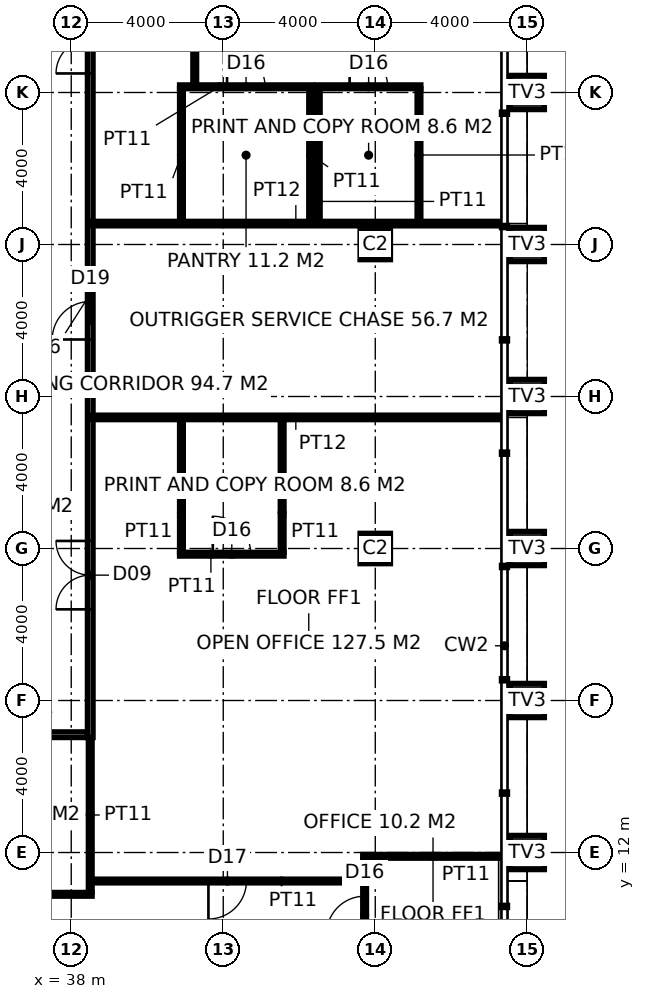
"""IFC4 building model, lengths in metres.
Left out: names, types, materials, properties, quantities, classifications, styles, units other than length and angle.
Written with IfcOpenShell. Run it as: python <this file> out.ifc"""

import sys

from ifc_helpers import new_model, si_unit, direction, frame, frame_2d, origin, origin_2d, place, context, subcontext, project, spatial, rectangle, hollow_rectangle, extrude, element, fill, save


model = new_model("IFC4")
c1 = context("Model", 3, precision=1e-05, world=origin(), true_north=direction((0.0, 1.0)))
c2 = subcontext(c1, "Body", "Model", "MODEL_VIEW")
j1 = project(units=[si_unit("LENGTHUNIT", "METRE"), si_unit("PLANEANGLEUNIT", "RADIAN")], contexts=[c1])
p1 = place(None, origin())
s1 = spatial("IfcSite", under=j1, at=p1, CompositionType="ELEMENT")
p2 = place(p1, origin())
s2 = spatial("IfcBuilding", under=s1, at=p2, CompositionType="ELEMENT")
p3 = place(p2, frame((0.0, 0.0, 238.2)))
s3 = spatial("IfcBuildingStorey", under=s2, at=p3, CompositionType="ELEMENT", Elevation=238.2)
for number, where, z_axis, x_axis in (
    (1, (50.0, 12.0, 0.0), (0.0, 0.0, 1.0), (1.0, 0.0, 0.0)),
    (2, (50.0, 16.0, 0.0), (0.0, 0.0, 1.0), (1.0, 0.0, 0.0)),
    (3, (50.0, 20.0, 0.0), (0.0, 0.0, 1.0), (1.0, 0.0, 0.0)),
    (4, (50.0, 24.0, 0.0), (0.0, 0.0, 1.0), (1.0, 0.0, 0.0)),
    (5, (50.0, 28.0, 0.0), (0.0, 0.0, 1.0), (1.0, 0.0, 0.0)),
    (6, (50.0, 32.0, 0.0), (0.0, 0.0, 1.0), (1.0, 0.0, 0.0)),
):
    element("IfcColumn", number, at=place(p3, frame(where, z_axis=z_axis, x_axis=x_axis)), inside=s3, PredefinedType="USERDEFINED", context=c2, shape_type="SweptSolid", body=[
        extrude(hollow_rectangle(XDim=0.9, YDim=0.9, WallThickness=0.08, at=origin_2d()), origin(), (0.0, 0.0, 1.0), 4.0),
    ])
for number, where, z_axis, x_axis in (
    (7, (46.0, 20.0, 0.0), (0.0, 0.0, 1.0), (1.0, 0.0, 0.0)),
    (8, (46.0, 28.0, 0.0), (0.0, 0.0, 1.0), (1.0, 0.0, 0.0)),
):
    element("IfcColumn", number, at=place(p3, frame(where, z_axis=z_axis, x_axis=x_axis)), inside=s3, PredefinedType="COLUMN", context=c2, shape_type="SweptSolid", body=[
        extrude(hollow_rectangle(XDim=0.8, YDim=0.8, WallThickness=0.08, at=origin_2d()), origin(), (0.0, 0.0, 1.0), 4.0),
    ])
p4 = place(p3, frame((38.5, 15.025, 0.0), z_axis=(0.0, 0.0, 1.0), x_axis=(0.0, 1.0, 0.0)))
e9 = element("IfcWall", 9, at=p4, inside=s3, PredefinedType="PARTITIONING", context=c2, shape_type="SweptSolid", body=[
    extrude(rectangle(XDim=23.35, YDim=0.15, at=frame_2d((11.675, 0.0))), origin(), (0.0, 0.0, 1.0), 2.65),
])
p5 = place(p4, frame((3.374, 0.0, 0.0)))
e10 = element("IfcOpeningElement", 10, at=p5, cuts=e9, PredefinedType="OPENING", context=c2, shape_type="SweptSolid", body=[
    extrude(rectangle(XDim=1.8, YDim=2.4, at=frame_2d((0.9, 1.2))), frame((0.0, 0.085, 0.0), z_axis=(0.0, -1.0, 0.0), x_axis=(1.0, 0.0, 0.0)), (0.0, 0.0, 1.0), 0.17),
])
p6 = place(p4, frame((17.476, 0.0, 0.0)))
e11 = element("IfcOpeningElement", 11, at=p6, cuts=e9, PredefinedType="OPENING", context=c2, shape_type="SweptSolid", body=[
    extrude(rectangle(XDim=1.8, YDim=2.4, at=frame_2d((0.9, 1.2))), frame((0.0, 0.085, 0.0), z_axis=(0.0, -1.0, 0.0), x_axis=(1.0, 0.0, 0.0)), (0.0, 0.0, 1.0), 0.17),
])
p7 = place(p4, frame((10.475, 0.0, 0.0)))
e12 = element("IfcOpeningElement", 12, at=p7, cuts=e9, PredefinedType="OPENING", context=c2, shape_type="SweptSolid", body=[
    extrude(rectangle(XDim=1.0, YDim=2.2, at=frame_2d((0.5, 1.1))), frame((0.0, 0.085, 0.0), z_axis=(0.0, -1.0, 0.0), x_axis=(1.0, 0.0, 0.0)), (0.0, 0.0, 1.0), 0.17),
])
p8 = place(p3, frame((15.775, 15.1, 0.0), z_axis=(0.0, 0.0, 1.0), x_axis=(1.0, 0.0, 0.0)))
e13 = element("IfcWall", 13, at=p8, inside=s3, PredefinedType="PARTITIONING", context=c2, shape_type="SweptSolid", body=[
    extrude(rectangle(XDim=22.65, YDim=0.15, at=frame_2d((11.325, 0.0))), origin(), (0.0, 0.0, 1.0), 3.85),
])
p9 = place(p8, frame((11.725, 0.0, 0.0)))
e14 = element("IfcOpeningElement", 14, at=p9, cuts=e13, PredefinedType="OPENING", context=c2, shape_type="SweptSolid", body=[
    extrude(rectangle(XDim=1.0, YDim=2.2, at=frame_2d((0.5, 1.1))), frame((0.0, 0.085, 0.0), z_axis=(0.0, -1.0, 0.0), x_axis=(1.0, 0.0, 0.0)), (0.0, 0.0, 1.0), 0.17),
])
for number, where, z_axis, x_axis in (
    (15, (38.5, 23.45, 0.0), (0.0, 0.0, 1.0), (1.0, 0.0, 0.0)),
    (16, (38.5, 28.55, 0.0), (0.0, 0.0, 1.0), (1.0, 0.0, 0.0)),
):
    element("IfcWall", number, at=place(p3, frame(where, z_axis=z_axis, x_axis=x_axis)), inside=s3, PredefinedType="PARTITIONING", context=c2, shape_type="SweptSolid", body=[
        extrude(rectangle(XDim=10.82, YDim=0.12, at=frame_2d((5.41, 0.0))), origin(), (0.0, 0.0, 1.0), 2.65),
    ])
p10 = place(p3, frame((30.611, 10.9, 0.0), z_axis=(0.0, 0.0, 1.0), x_axis=(1.0, 0.0, 0.0)))
e17 = element("IfcWall", 17, at=p10, inside=s3, PredefinedType="PARTITIONING", context=c2, shape_type="SweptSolid", body=[
    extrude(rectangle(XDim=7.939, YDim=0.1, at=frame_2d((3.969, 0.0))), origin(), (0.0, 0.0, 1.0), 3.85),
])
p11 = place(p10, frame((1.065, 0.0, 0.0)))
e18 = element("IfcOpeningElement", 18, at=p11, cuts=e17, PredefinedType="OPENING", context=c2, shape_type="SweptSolid", body=[
    extrude(rectangle(XDim=1.0, YDim=2.2, at=frame_2d((0.5, 1.1))), frame((0.0, 0.06, 0.0), z_axis=(0.0, -1.0, 0.0), x_axis=(1.0, 0.0, 0.0)), (0.0, 0.0, 1.0), 0.12),
])
p12 = place(p10, frame((5.04, 0.0, 0.0)))
e19 = element("IfcOpeningElement", 19, at=p12, cuts=e17, PredefinedType="OPENING", context=c2, shape_type="SweptSolid", body=[
    extrude(rectangle(XDim=1.0, YDim=2.2, at=frame_2d((0.5, 1.1))), frame((0.0, 0.06, 0.0), z_axis=(0.0, -1.0, 0.0), x_axis=(1.0, 0.0, 0.0)), (0.0, 0.0, 1.0), 0.12),
])
p13 = place(p3, frame((45.67, 11.9, 0.0), z_axis=(0.0, 0.0, 1.0), x_axis=(1.0, 0.0, 0.0)))
e20 = element("IfcWall", 20, at=p13, inside=s3, PredefinedType="PARTITIONING", context=c2, shape_type="SweptSolid", body=[
    extrude(rectangle(XDim=3.7, YDim=0.1, at=frame_2d((1.85, 0.0))), origin(), (0.0, 0.0, 1.0), 3.85),
])
p14 = place(p3, frame((40.85, 19.85, 0.0), z_axis=(0.0, 0.0, 1.0), x_axis=(1.0, 0.0, 0.0)))
e21 = element("IfcWall", 21, at=p14, inside=s3, PredefinedType="PARTITIONING", context=c2, shape_type="SweptSolid", body=[
    extrude(rectangle(XDim=2.75, YDim=0.1, at=frame_2d((1.375, 0.0))), origin(), (0.0, 0.0, 1.0), 2.85),
])
p15 = place(p14, frame((0.875, 0.0, 0.0)))
e22 = element("IfcOpeningElement", 22, at=p15, cuts=e21, PredefinedType="OPENING", context=c2, shape_type="SweptSolid", body=[
    extrude(rectangle(XDim=1.0, YDim=2.2, at=frame_2d((0.5, 1.1))), frame((0.0, 0.06, 0.0), z_axis=(0.0, -1.0, 0.0), x_axis=(1.0, 0.0, 0.0)), (0.0, 0.0, 1.0), 0.12),
])
p16 = place(p3, frame((40.85, 32.15, 0.0), z_axis=(0.0, 0.0, 1.0), x_axis=(1.0, 0.0, 0.0)))
e23 = element("IfcWall", 23, at=p16, inside=s3, PredefinedType="PARTITIONING", context=c2, shape_type="SweptSolid", body=[
    extrude(rectangle(XDim=3.5, YDim=0.1, at=frame_2d((1.75, 0.0))), origin(), (0.0, 0.0, 1.0), 2.95),
])
p17 = place(p16, frame((1.25, 0.0, 0.0)))
e24 = element("IfcOpeningElement", 24, at=p17, cuts=e23, PredefinedType="OPENING", context=c2, shape_type="SweptSolid", body=[
    extrude(rectangle(XDim=1.0, YDim=2.2, at=frame_2d((0.5, 1.1))), frame((0.0, 0.06, 0.0), z_axis=(0.0, -1.0, 0.0), x_axis=(1.0, 0.0, 0.0)), (0.0, 0.0, 1.0), 0.12),
])
p18 = place(p3, frame((44.45, 32.15, 0.0), z_axis=(0.0, 0.0, 1.0), x_axis=(1.0, 0.0, 0.0)))
e25 = element("IfcWall", 25, at=p18, inside=s3, PredefinedType="PARTITIONING", context=c2, shape_type="SweptSolid", body=[
    extrude(rectangle(XDim=2.75, YDim=0.1, at=frame_2d((1.375, 0.0))), origin(), (0.0, 0.0, 1.0), 2.95),
])
p19 = place(p18, frame((0.875, 0.0, 0.0)))
e26 = element("IfcOpeningElement", 26, at=p19, cuts=e25, PredefinedType="OPENING", context=c2, shape_type="SweptSolid", body=[
    extrude(rectangle(XDim=1.0, YDim=2.2, at=frame_2d((0.5, 1.1))), frame((0.0, 0.06, 0.0), z_axis=(0.0, -1.0, 0.0), x_axis=(1.0, 0.0, 0.0)), (0.0, 0.0, 1.0), 0.12),
])
p20 = place(p3, frame((38.5, 10.95, 0.0), z_axis=(0.0, 0.0, 1.0), x_axis=(0.0, 1.0, 0.0)))
e27 = element("IfcWall", 27, at=p20, inside=s3, PredefinedType="PARTITIONING", context=c2, shape_type="SweptSolid", body=[
    extrude(rectangle(XDim=4.075, YDim=0.1, at=frame_2d((2.038, 0.0))), origin(), (0.0, 0.0, 1.0), 2.65),
])
for number, where, z_axis, x_axis in (
    (28, (40.9, 19.9, 0.0), (0.0, 0.0, 1.0), (0.0, 1.0, 0.0)),
    (29, (40.9, 28.61, 0.0), (0.0, 0.0, 1.0), (0.0, 1.0, 0.0)),
    (30, (43.55, 19.9, 0.0), (0.0, 0.0, 1.0), (0.0, 1.0, 0.0)),
    (31, (44.3, 28.61, 0.0), (0.0, 0.0, 1.0), (0.0, 1.0, 0.0)),
    (32, (44.5, 28.61, 0.0), (0.0, 0.0, 1.0), (0.0, 1.0, 0.0)),
):
    element("IfcWall", number, at=place(p3, frame(where, z_axis=z_axis, x_axis=x_axis)), inside=s3, PredefinedType="PARTITIONING", context=c2, shape_type="SweptSolid", body=[
        extrude(rectangle(XDim=3.49, YDim=0.1, at=frame_2d((1.745, 0.0))), origin(), (0.0, 0.0, 1.0), 3.85),
    ])
p21 = place(p3, frame((45.72, 8.85, 0.0), z_axis=(0.0, 0.0, 1.0), x_axis=(0.0, 1.0, 0.0)))
e33 = element("IfcWall", 33, at=p21, inside=s3, PredefinedType="PARTITIONING", context=c2, shape_type="SweptSolid", body=[
    extrude(rectangle(XDim=3.0, YDim=0.1, at=frame_2d((1.5, 0.0))), origin(), (0.0, 0.0, 1.0), 2.65),
])
p22 = place(p21, frame((1.0, 0.0, 0.0)))
e34 = element("IfcOpeningElement", 34, at=p22, cuts=e33, PredefinedType="OPENING", context=c2, shape_type="SweptSolid", body=[
    extrude(rectangle(XDim=1.0, YDim=2.2, at=frame_2d((0.5, 1.1))), frame((0.0, 0.06, 0.0), z_axis=(0.0, -1.0, 0.0), x_axis=(1.0, 0.0, 0.0)), (0.0, 0.0, 1.0), 0.12),
])
p23 = place(p3, frame((47.15, 28.61, 0.0), z_axis=(0.0, 0.0, 1.0), x_axis=(0.0, 1.0, 0.0)))
e35 = element("IfcWall", 35, at=p23, inside=s3, PredefinedType="PARTITIONING", context=c2, shape_type="SweptSolid", body=[
    extrude(rectangle(XDim=3.49, YDim=0.1, at=frame_2d((1.745, 0.0))), origin(), (0.0, 0.0, 1.0), 3.85),
])
p24 = place(p3, frame((45.67, 11.25, 0.0), z_axis=(0.0, 0.0, 1.0), x_axis=(-1.0, 0.0, 0.0)))
e36 = element("IfcWall", 36, at=p24, inside=s3, PredefinedType="PARTITIONING", context=c2, shape_type="SweptSolid", body=[
    extrude(rectangle(XDim=7.12, YDim=0.1, at=frame_2d((3.56, 0.0))), origin(), (0.0, 0.0, 1.0), 3.85),
])
p25 = place(p24, frame((3.06, 0.0, 0.0)))
e37 = element("IfcOpeningElement", 37, at=p25, cuts=e36, PredefinedType="OPENING", context=c2, shape_type="SweptSolid", body=[
    extrude(rectangle(XDim=1.0, YDim=2.2, at=frame_2d((0.5, 1.1))), frame((0.0, 0.06, 0.0), z_axis=(0.0, -1.0, 0.0), x_axis=(1.0, 0.0, 0.0)), (0.0, 0.0, 1.0), 0.12),
])
p26 = place(p3, frame((41.25, 32.2, 0.0), z_axis=(0.0, 0.0, 1.0), x_axis=(0.0, 1.0, 0.0)))
e38 = element("IfcWall", 38, at=p26, inside=s3, PredefinedType="PARTITIONING", context=c2, shape_type="SweptSolid", body=[
    extrude(rectangle(XDim=7.47, YDim=0.1, at=frame_2d((3.735, 0.0))), origin(), (0.0, 0.0, 1.0), 3.85),
])
p27 = place(p26, frame((3.235, 0.0, 0.0)))
e39 = element("IfcOpeningElement", 39, at=p27, cuts=e38, PredefinedType="OPENING", context=c2, shape_type="SweptSolid", body=[
    extrude(rectangle(XDim=1.0, YDim=2.2, at=frame_2d((0.5, 1.1))), frame((0.0, 0.06, 0.0), z_axis=(0.0, -1.0, 0.0), x_axis=(1.0, 0.0, 0.0)), (0.0, 0.0, 1.0), 0.12),
])
p28 = place(p5, origin())
e40 = element("IfcDoor", 40, at=p28, inside=s3, OperationType="DOUBLE_DOOR_DOUBLE_SWING", PredefinedType="DOOR", context=c2, shape_type="SweptSolid", body=[
    extrude(rectangle(XDim=1.8, YDim=2.4, at=frame_2d((0.9, 1.2))), frame((0.0, 0.025, 0.0), z_axis=(0.0, -1.0, 0.0), x_axis=(1.0, 0.0, 0.0)), (0.0, 0.0, 1.0), 0.05),
])
fill(e10, e40)
p29 = place(p6, origin())
e41 = element("IfcDoor", 41, at=p29, inside=s3, OperationType="DOUBLE_DOOR_DOUBLE_SWING", PredefinedType="DOOR", context=c2, shape_type="SweptSolid", body=[
    extrude(rectangle(XDim=1.8, YDim=2.4, at=frame_2d((0.9, 1.2))), frame((0.0, 0.025, 0.0), z_axis=(0.0, -1.0, 0.0), x_axis=(1.0, 0.0, 0.0)), (0.0, 0.0, 1.0), 0.05),
])
fill(e11, e41)
p30 = place(p7, origin())
e42 = element("IfcDoor", 42, at=p30, inside=s3, OperationType="SINGLE_SWING_LEFT", PredefinedType="DOOR", context=c2, shape_type="SweptSolid", body=[
    extrude(rectangle(XDim=1.0, YDim=2.2, at=frame_2d((0.5, 1.1))), frame((0.0, 0.025, 0.0), z_axis=(0.0, -1.0, 0.0), x_axis=(1.0, 0.0, 0.0)), (0.0, 0.0, 1.0), 0.05),
])
fill(e12, e42)
p31 = place(p15, origin())
e43 = element("IfcDoor", 43, at=p31, inside=s3, OperationType="SINGLE_SWING_LEFT", PredefinedType="DOOR", context=c2, shape_type="SweptSolid", body=[
    extrude(rectangle(XDim=1.0, YDim=2.2, at=frame_2d((0.5, 1.1))), frame((0.0, 0.025, 0.0), z_axis=(0.0, -1.0, 0.0), x_axis=(1.0, 0.0, 0.0)), (0.0, 0.0, 1.0), 0.05),
])
fill(e22, e43)
p32 = place(p22, origin())
e44 = element("IfcDoor", 44, at=p32, inside=s3, OperationType="SINGLE_SWING_LEFT", PredefinedType="DOOR", context=c2, shape_type="SweptSolid", body=[
    extrude(rectangle(XDim=1.0, YDim=2.2, at=frame_2d((0.5, 1.1))), frame((0.0, 0.025, 0.0), z_axis=(0.0, -1.0, 0.0), x_axis=(1.0, 0.0, 0.0)), (0.0, 0.0, 1.0), 0.05),
])
fill(e34, e44)
p33 = place(p17, origin())
e45 = element("IfcDoor", 45, at=p33, inside=s3, OperationType="SINGLE_SWING_LEFT", PredefinedType="DOOR", context=c2, shape_type="SweptSolid", body=[
    extrude(rectangle(XDim=1.0, YDim=2.2, at=frame_2d((0.5, 1.1))), frame((0.0, 0.025, 0.0), z_axis=(0.0, -1.0, 0.0), x_axis=(1.0, 0.0, 0.0)), (0.0, 0.0, 1.0), 0.05),
])
fill(e24, e45)
p34 = place(p19, origin())
e46 = element("IfcDoor", 46, at=p34, inside=s3, OperationType="SINGLE_SWING_LEFT", PredefinedType="DOOR", context=c2, shape_type="SweptSolid", body=[
    extrude(rectangle(XDim=1.0, YDim=2.2, at=frame_2d((0.5, 1.1))), frame((0.0, 0.025, 0.0), z_axis=(0.0, -1.0, 0.0), x_axis=(1.0, 0.0, 0.0)), (0.0, 0.0, 1.0), 0.05),
])
fill(e26, e46)
p35 = place(p25, origin())
e47 = element("IfcDoor", 47, at=p35, inside=s3, OperationType="SINGLE_SWING_RIGHT", PredefinedType="DOOR", context=c2, shape_type="SweptSolid", body=[
    extrude(rectangle(XDim=1.0, YDim=2.2, at=frame_2d((0.5, 1.1))), frame((0.0, 0.025, 0.0), z_axis=(0.0, -1.0, 0.0), x_axis=(1.0, 0.0, 0.0)), (0.0, 0.0, 1.0), 0.05),
])
fill(e37, e47)
save(model, sys.argv[1])
